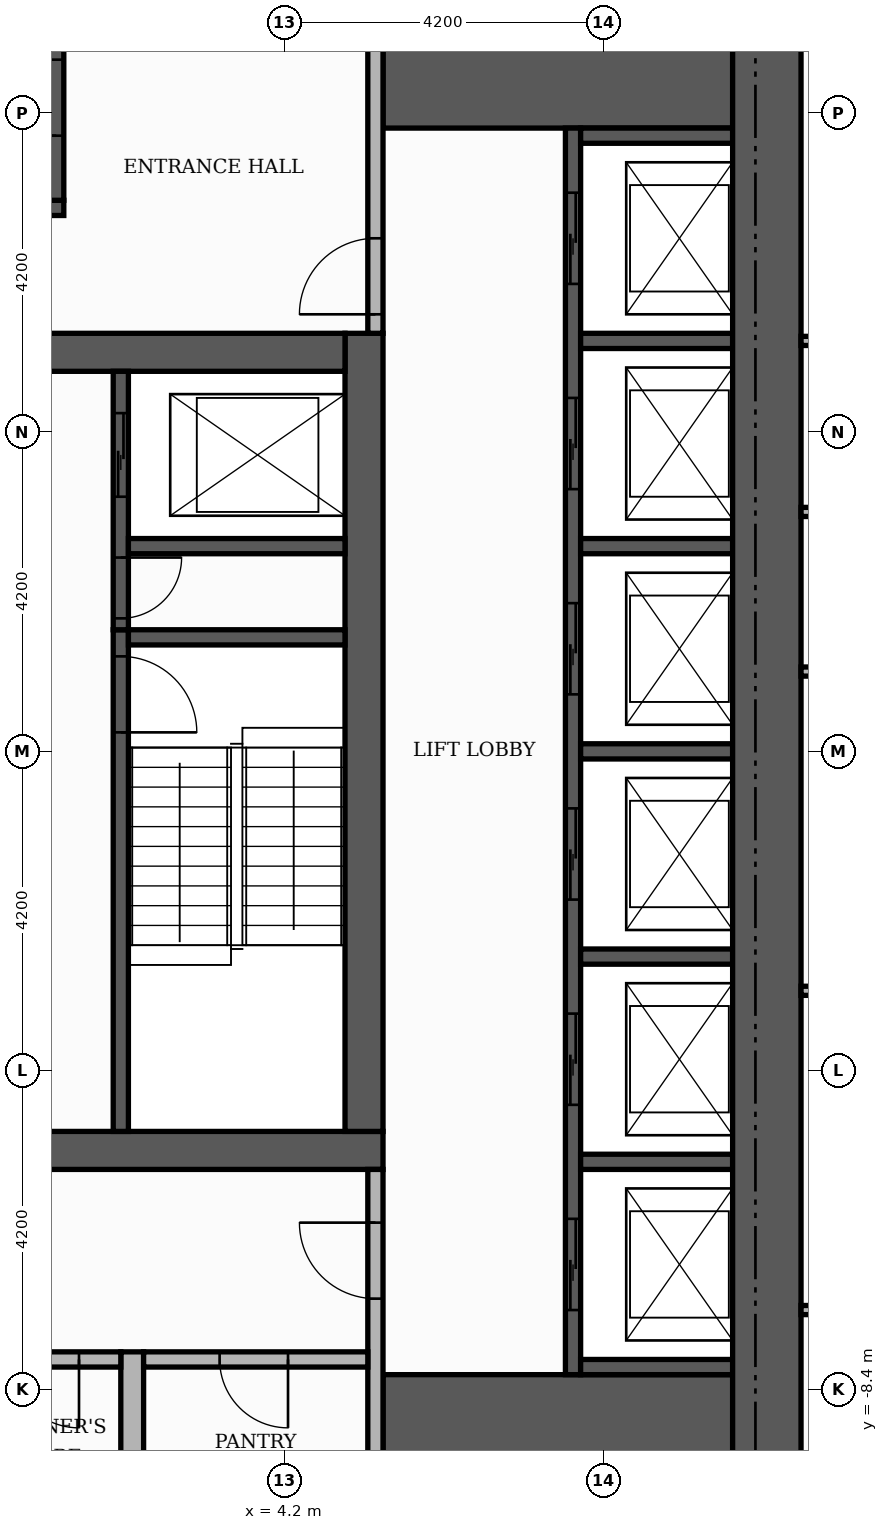
"""IFC4 building model, lengths in metres.
Left out: names, types, materials, properties, quantities, classifications, styles, units other than length and angle.
Written with IfcOpenShell. Run it as: python <this file> out.ifc"""

import sys

from ifc_helpers import new_model, si_unit, direction, frame, frame_2d, origin, place, context, subcontext, project, spatial, rectangle, extrude, element, fill, save


model = new_model("IFC4")
c1 = context("Model", 3, precision=1e-05, world=origin(), true_north=direction((0.0, 1.0)))
c2 = subcontext(c1, "Body", "Model", "MODEL_VIEW")
j1 = project(units=[si_unit("LENGTHUNIT", "METRE"), si_unit("PLANEANGLEUNIT", "RADIAN")], contexts=[c1])
p1 = place(None, origin())
s1 = spatial("IfcSite", under=j1, at=p1, CompositionType="ELEMENT")
p2 = place(p1, origin())
s2 = spatial("IfcBuilding", under=s1, at=p2, CompositionType="ELEMENT")
p3 = place(p2, frame((0.0, 0.0, 204.0)))
s3 = spatial("IfcBuildingStorey", under=s2, at=p3, CompositionType="ELEMENT", Elevation=204.0)
p4 = place(p3, frame((-5.5, -5.25, 0.0), z_axis=(0.0, 0.0, 1.0), x_axis=(1.0, 0.0, 0.0)))
e1 = element("IfcWall", 1, at=p4, inside=s3, PredefinedType="SHEAR", context=c2, shape_type="SweptSolid", body=[
    extrude(rectangle(XDim=11.0, YDim=0.5, at=frame_2d((5.5, 0.0))), origin(), (0.0, 0.0, 1.0), 3.48),
])
p5 = place(p4, frame((4.9, 0.0, 0.0)))
e2 = element("IfcOpeningElement", 2, at=p5, cuts=e1, PredefinedType="OPENING", context=c2, shape_type="SweptSolid", body=[
    extrude(rectangle(XDim=1.2, YDim=2.1, at=frame_2d((0.6, 1.05))), frame((0.0, 0.26, 0.0), z_axis=(0.0, -1.0, 0.0), x_axis=(1.0, 0.0, 0.0)), (0.0, 0.0, 1.0), 0.52),
])
p6 = place(p3, frame((5.25, -5.0, 0.0), z_axis=(0.0, 0.0, 1.0), x_axis=(0.0, 1.0, 0.0)))
e3 = element("IfcWall", 3, at=p6, inside=s3, PredefinedType="SHEAR", context=c2, shape_type="SweptSolid", body=[
    extrude(rectangle(XDim=10.5, YDim=0.5, at=frame_2d((5.25, 0.0))), origin(), (0.0, 0.0, 1.0), 3.48),
])
p7 = place(p3, frame((-5.0, 5.25, 0.0), z_axis=(0.0, 0.0, 1.0), x_axis=(1.0, 0.0, 0.0)))
e4 = element("IfcWall", 4, at=p7, inside=s3, PredefinedType="SHEAR", context=c2, shape_type="SweptSolid", body=[
    extrude(rectangle(XDim=10.0, YDim=0.5, at=frame_2d((5.0, 0.0))), origin(), (0.0, 0.0, 1.0), 3.48),
])
p8 = place(p7, frame((4.4, 0.0, 0.0)))
e5 = element("IfcOpeningElement", 5, at=p8, cuts=e4, PredefinedType="OPENING", context=c2, shape_type="SweptSolid", body=[
    extrude(rectangle(XDim=1.2, YDim=2.1, at=frame_2d((0.6, 1.05))), frame((0.0, 0.26, 0.0), z_axis=(0.0, -1.0, 0.0), x_axis=(1.0, 0.0, 0.0)), (0.0, 0.0, 1.0), 0.52),
])
for number, where, z_axis, x_axis in (
    (6, (5.5, -9.15, 0.0), (0.0, 0.0, 1.0), (1.0, 0.0, 0.0)),
    (7, (5.5, 9.15, 0.0), (0.0, 0.0, 1.0), (1.0, 0.0, 0.0)),
):
    element("IfcWall", number, at=place(p3, frame(where, z_axis=z_axis, x_axis=x_axis)), inside=s3, PredefinedType="SHEAR", context=c2, shape_type="SweptSolid", body=[
        extrude(rectangle(XDim=4.6, YDim=1.9, at=frame_2d((2.3, 0.0))), origin(), (0.0, 0.0, 1.0), 3.48),
    ])
p9 = place(p3, frame((2.05, -5.0, 0.0), z_axis=(0.0, 0.0, 1.0), x_axis=(0.0, 1.0, 0.0)))
e8 = element("IfcWall", 8, at=p9, inside=s3, PredefinedType="SHEAR", context=c2, shape_type="SweptSolid", body=[
    extrude(rectangle(XDim=6.6, YDim=0.2, at=frame_2d((3.3, 0.0))), origin(), (0.0, 0.0, 1.0), 3.48),
])
p10 = place(p9, frame((5.25, 0.0, 0.0)))
e9 = element("IfcOpeningElement", 9, at=p10, cuts=e8, PredefinedType="OPENING", context=c2, shape_type="SweptSolid", body=[
    extrude(rectangle(XDim=1.0, YDim=2.1, at=frame_2d((0.5, 1.05))), frame((0.0, 0.11, 0.0), z_axis=(0.0, -1.0, 0.0), x_axis=(1.0, 0.0, 0.0)), (0.0, 0.0, 1.0), 0.22),
])
p11 = place(p3, frame((2.15, 1.5, 0.0), z_axis=(0.0, 0.0, 1.0), x_axis=(1.0, 0.0, 0.0)))
e10 = element("IfcWall", 10, at=p11, inside=s3, PredefinedType="SHEAR", context=c2, shape_type="SweptSolid", body=[
    extrude(rectangle(XDim=2.85, YDim=0.2, at=frame_2d((1.425, 0.0))), origin(), (0.0, 0.0, 1.0), 3.48),
])
p12 = place(p3, frame((-5.5, 7.15, 0.0), z_axis=(0.0, 0.0, 1.0), x_axis=(1.0, 0.0, 0.0)))
e11 = element("IfcWall", 11, at=p12, inside=s3, PredefinedType="SHEAR", context=c2, shape_type="SweptSolid", body=[
    extrude(rectangle(XDim=6.8, YDim=0.2, at=frame_2d((3.4, 0.0))), origin(), (0.0, 0.0, 1.0), 3.48),
])
p13 = place(p3, frame((1.2, 7.25, 0.0), z_axis=(0.0, 0.0, 1.0), x_axis=(0.0, 1.0, 0.0)))
e12 = element("IfcWall", 12, at=p13, inside=s3, PredefinedType="SHEAR", context=c2, shape_type="SweptSolid", body=[
    extrude(rectangle(XDim=2.85, YDim=0.2, at=frame_2d((1.425, 0.0))), origin(), (0.0, 0.0, 1.0), 3.48),
])
p14 = place(p13, frame((0.85, 0.0, 0.0)))
e13 = element("IfcOpeningElement", 13, at=p14, cuts=e12, PredefinedType="OPENING", context=c2, shape_type="SweptSolid", body=[
    extrude(rectangle(XDim=1.0, YDim=2.1, at=frame_2d((0.5, 1.05))), frame((0.0, 0.11, 0.0), z_axis=(0.0, -1.0, 0.0), x_axis=(1.0, 0.0, 0.0)), (0.0, 0.0, 1.0), 0.22),
])
p15 = place(p3, frame((8.0, -8.2, 0.0), z_axis=(0.0, 0.0, 1.0), x_axis=(0.0, 1.0, 0.0)))
e14 = element("IfcWall", 14, at=p15, inside=s3, PredefinedType="SHEAR", context=c2, shape_type="SweptSolid", body=[
    extrude(rectangle(XDim=16.4, YDim=0.2, at=frame_2d((8.2, 0.0))), origin(), (0.0, 0.0, 1.0), 3.48),
])
p16 = place(p15, frame((0.85, 0.0, 0.0)))
e15 = element("IfcOpeningElement", 15, at=p16, cuts=e14, PredefinedType="OPENING", context=c2, shape_type="SweptSolid", body=[
    extrude(rectangle(XDim=1.2, YDim=2.1, at=frame_2d((0.6, 1.05))), frame((0.0, 0.11, 0.0), z_axis=(0.0, -1.0, 0.0), x_axis=(1.0, 0.0, 0.0)), (0.0, 0.0, 1.0), 0.22),
])
p17 = place(p15, frame((3.55, 0.0, 0.0)))
e16 = element("IfcOpeningElement", 16, at=p17, cuts=e14, PredefinedType="OPENING", context=c2, shape_type="SweptSolid", body=[
    extrude(rectangle(XDim=1.2, YDim=2.1, at=frame_2d((0.6, 1.05))), frame((0.0, 0.11, 0.0), z_axis=(0.0, -1.0, 0.0), x_axis=(1.0, 0.0, 0.0)), (0.0, 0.0, 1.0), 0.22),
])
p18 = place(p15, frame((6.25, 0.0, 0.0)))
e17 = element("IfcOpeningElement", 17, at=p18, cuts=e14, PredefinedType="OPENING", context=c2, shape_type="SweptSolid", body=[
    extrude(rectangle(XDim=1.2, YDim=2.1, at=frame_2d((0.6, 1.05))), frame((0.0, 0.11, 0.0), z_axis=(0.0, -1.0, 0.0), x_axis=(1.0, 0.0, 0.0)), (0.0, 0.0, 1.0), 0.22),
])
p19 = place(p15, frame((8.95, 0.0, 0.0)))
e18 = element("IfcOpeningElement", 18, at=p19, cuts=e14, PredefinedType="OPENING", context=c2, shape_type="SweptSolid", body=[
    extrude(rectangle(XDim=1.2, YDim=2.1, at=frame_2d((0.6, 1.05))), frame((0.0, 0.11, 0.0), z_axis=(0.0, -1.0, 0.0), x_axis=(1.0, 0.0, 0.0)), (0.0, 0.0, 1.0), 0.22),
])
p20 = place(p15, frame((11.65, 0.0, 0.0)))
e19 = element("IfcOpeningElement", 19, at=p20, cuts=e14, PredefinedType="OPENING", context=c2, shape_type="SweptSolid", body=[
    extrude(rectangle(XDim=1.2, YDim=2.1, at=frame_2d((0.6, 1.05))), frame((0.0, 0.11, 0.0), z_axis=(0.0, -1.0, 0.0), x_axis=(1.0, 0.0, 0.0)), (0.0, 0.0, 1.0), 0.22),
])
p21 = place(p15, frame((14.35, 0.0, 0.0)))
e20 = element("IfcOpeningElement", 20, at=p21, cuts=e14, PredefinedType="OPENING", context=c2, shape_type="SweptSolid", body=[
    extrude(rectangle(XDim=1.2, YDim=2.1, at=frame_2d((0.6, 1.05))), frame((0.0, 0.11, 0.0), z_axis=(0.0, -1.0, 0.0), x_axis=(1.0, 0.0, 0.0)), (0.0, 0.0, 1.0), 0.22),
])
for number, where, z_axis, x_axis in (
    (21, (8.1, -8.1, 0.0), (0.0, 0.0, 1.0), (1.0, 0.0, 0.0)),
    (22, (8.1, -5.4, 0.0), (0.0, 0.0, 1.0), (1.0, 0.0, 0.0)),
    (23, (8.1, -2.7, 0.0), (0.0, 0.0, 1.0), (1.0, 0.0, 0.0)),
    (24, (8.1, 0.0, 0.0), (0.0, 0.0, 1.0), (1.0, 0.0, 0.0)),
):
    element("IfcWall", number, at=place(p3, frame(where, z_axis=z_axis, x_axis=x_axis)), inside=s3, PredefinedType="SHEAR", context=c2, shape_type="SweptSolid", body=[
        extrude(rectangle(XDim=2.0, YDim=0.2, at=frame_2d((1.0, 0.0))), origin(), (0.0, 0.0, 1.0), 3.48),
    ])
p22 = place(p3, frame((2.05, 1.6, 0.0), z_axis=(0.0, 0.0, 1.0), x_axis=(0.0, 1.0, 0.0)))
e25 = element("IfcWall", 25, at=p22, inside=s3, PredefinedType="SHEAR", context=c2, shape_type="SweptSolid", body=[
    extrude(rectangle(XDim=3.4, YDim=0.2, at=frame_2d((1.7, 0.0))), origin(), (0.0, 0.0, 1.0), 3.48),
])
p23 = place(p22, frame((1.75, 0.0, 0.0)))
e26 = element("IfcOpeningElement", 26, at=p23, cuts=e25, PredefinedType="OPENING", context=c2, shape_type="SweptSolid", body=[
    extrude(rectangle(XDim=1.1, YDim=2.1, at=frame_2d((0.55, 1.05))), frame((0.0, 0.11, 0.0), z_axis=(0.0, -1.0, 0.0), x_axis=(1.0, 0.0, 0.0)), (0.0, 0.0, 1.0), 0.22),
])
p24 = place(p22, frame((0.15, 0.0, 0.0)))
e27 = element("IfcOpeningElement", 27, at=p24, cuts=e25, PredefinedType="OPENING", context=c2, shape_type="SweptSolid", body=[
    extrude(rectangle(XDim=0.8, YDim=2.1, at=frame_2d((0.4, 1.05))), frame((0.0, 0.11, 0.0), z_axis=(0.0, -1.0, 0.0), x_axis=(1.0, 0.0, 0.0)), (0.0, 0.0, 1.0), 0.22),
])
p25 = place(p3, frame((2.15, 2.7, 0.0), z_axis=(0.0, 0.0, 1.0), x_axis=(1.0, 0.0, 0.0)))
e28 = element("IfcWall", 28, at=p25, inside=s3, PredefinedType="SHEAR", context=c2, shape_type="SweptSolid", body=[
    extrude(rectangle(XDim=2.85, YDim=0.2, at=frame_2d((1.425, 0.0))), origin(), (0.0, 0.0, 1.0), 3.48),
])
for number, where, z_axis, x_axis in (
    (29, (8.1, 2.7, 0.0), (0.0, 0.0, 1.0), (1.0, 0.0, 0.0)),
    (30, (8.1, 5.4, 0.0), (0.0, 0.0, 1.0), (1.0, 0.0, 0.0)),
    (31, (8.1, 8.1, 0.0), (0.0, 0.0, 1.0), (1.0, 0.0, 0.0)),
):
    element("IfcWall", number, at=place(p3, frame(where, z_axis=z_axis, x_axis=x_axis)), inside=s3, PredefinedType="SHEAR", context=c2, shape_type="SweptSolid", body=[
        extrude(rectangle(XDim=2.0, YDim=0.2, at=frame_2d((1.0, 0.0))), origin(), (0.0, 0.0, 1.0), 3.48),
    ])
p26 = place(p3, frame((10.55, -10.1, 0.0), z_axis=(0.0, 0.0, 1.0), x_axis=(0.0, 1.0, 0.0)))
e32 = element("IfcWall", 32, at=p26, inside=s3, PredefinedType="SHEAR", context=c2, shape_type="SweptSolid", body=[
    extrude(rectangle(XDim=20.2, YDim=0.9, at=frame_2d((10.1, 0.0))), origin(), (0.0, 0.0, 1.0), 3.48),
])
p27 = place(p3, frame((2.2, -10.1, 0.0), z_axis=(0.0, 0.0, 1.0), x_axis=(0.0, 1.0, 0.0)))
e33 = element("IfcWall", 33, at=p27, inside=s3, PredefinedType="PARTITIONING", context=c2, shape_type="SweptSolid", body=[
    extrude(rectangle(XDim=2.2, YDim=0.3, at=frame_2d((1.1, 0.0))), origin(), (0.0, 0.0, 1.0), 3.48),
])
p28 = place(p3, frame((5.4, -10.1, 0.0), z_axis=(0.0, 0.0, 1.0), x_axis=(0.0, 1.0, 0.0)))
e34 = element("IfcWall", 34, at=p28, inside=s3, PredefinedType="PARTITIONING", context=c2, shape_type="SweptSolid", body=[
    extrude(rectangle(XDim=4.6, YDim=0.2, at=frame_2d((2.3, 0.0))), origin(), (0.0, 0.0, 1.0), 3.48),
])
p29 = place(p28, frame((2.9, 0.0, 0.0)))
e35 = element("IfcOpeningElement", 35, at=p29, cuts=e34, PredefinedType="OPENING", context=c2, shape_type="SweptSolid", body=[
    extrude(rectangle(XDim=1.0, YDim=2.1, at=frame_2d((0.5, 1.05))), frame((0.0, 0.11, 0.0), z_axis=(0.0, -1.0, 0.0), x_axis=(1.0, 0.0, 0.0)), (0.0, 0.0, 1.0), 0.22),
])
p30 = place(p3, frame((0.1, -8.0, 0.0), z_axis=(0.0, 0.0, 1.0), x_axis=(1.0, 0.0, 0.0)))
e36 = element("IfcWall", 36, at=p30, inside=s3, PredefinedType="PARTITIONING", context=c2, shape_type="SweptSolid", body=[
    extrude(rectangle(XDim=1.95, YDim=0.2, at=frame_2d((0.975, 0.0))), origin(), (0.0, 0.0, 1.0), 3.48),
])
p31 = place(p30, frame((0.5, 0.0, 0.0)))
e37 = element("IfcOpeningElement", 37, at=p31, cuts=e36, PredefinedType="OPENING", context=c2, shape_type="SweptSolid", body=[
    extrude(rectangle(XDim=0.9, YDim=2.1, at=frame_2d((0.45, 1.05))), frame((0.0, 0.11, 0.0), z_axis=(0.0, -1.0, 0.0), x_axis=(1.0, 0.0, 0.0)), (0.0, 0.0, 1.0), 0.22),
])
p32 = place(p3, frame((2.35, -8.0, 0.0), z_axis=(0.0, 0.0, 1.0), x_axis=(1.0, 0.0, 0.0)))
e38 = element("IfcWall", 38, at=p32, inside=s3, PredefinedType="PARTITIONING", context=c2, shape_type="SweptSolid", body=[
    extrude(rectangle(XDim=2.95, YDim=0.2, at=frame_2d((1.475, 0.0))), origin(), (0.0, 0.0, 1.0), 3.48),
])
p33 = place(p32, frame((1.0, 0.0, 0.0)))
e39 = element("IfcOpeningElement", 39, at=p33, cuts=e38, PredefinedType="OPENING", context=c2, shape_type="SweptSolid", body=[
    extrude(rectangle(XDim=0.9, YDim=2.1, at=frame_2d((0.45, 1.05))), frame((0.0, 0.11, 0.0), z_axis=(0.0, -1.0, 0.0), x_axis=(1.0, 0.0, 0.0)), (0.0, 0.0, 1.0), 0.22),
])
p34 = place(p3, frame((5.4, 5.5, 0.0), z_axis=(0.0, 0.0, 1.0), x_axis=(0.0, 1.0, 0.0)))
e40 = element("IfcWall", 40, at=p34, inside=s3, PredefinedType="PARTITIONING", context=c2, shape_type="SweptSolid", body=[
    extrude(rectangle(XDim=4.6, YDim=0.2, at=frame_2d((2.3, 0.0))), origin(), (0.0, 0.0, 1.0), 3.48),
])
p35 = place(p34, frame((0.25, 0.0, 0.0)))
e41 = element("IfcOpeningElement", 41, at=p35, cuts=e40, PredefinedType="OPENING", context=c2, shape_type="SweptSolid", body=[
    extrude(rectangle(XDim=1.0, YDim=2.1, at=frame_2d((0.5, 1.05))), frame((0.0, 0.11, 0.0), z_axis=(0.0, -1.0, 0.0), x_axis=(1.0, 0.0, 0.0)), (0.0, 0.0, 1.0), 0.22),
])
p36 = place(p3, frame((11.0, -7.35, 0.0), z_axis=(0.0, 0.0, 1.0), x_axis=(1.0, 0.0, 0.0)))
e42 = element("IfcWall", 42, at=p36, inside=s3, PredefinedType="PARTITIONING", context=c2, shape_type="SweptSolid", body=[
    extrude(rectangle(XDim=7.62, YDim=0.12, at=frame_2d((3.81, 0.0))), origin(), (0.0, 0.0, 1.0), 3.48),
])
p37 = place(p36, frame((3.36, 0.0, 0.0)))
e43 = element("IfcOpeningElement", 43, at=p37, cuts=e42, PredefinedType="OPENING", context=c2, shape_type="SweptSolid", body=[
    extrude(rectangle(XDim=0.9, YDim=2.1, at=frame_2d((0.45, 1.05))), frame((0.0, 0.07, 0.0), z_axis=(0.0, -1.0, 0.0), x_axis=(1.0, 0.0, 0.0)), (0.0, 0.0, 1.0), 0.14),
])
for number, where, z_axis, x_axis in (
    (44, (11.0, -3.15, 0.0), (0.0, 0.0, 1.0), (1.0, 0.0, 0.0)),
    (45, (11.0, 1.05, 0.0), (0.0, 0.0, 1.0), (1.0, 0.0, 0.0)),
    (46, (11.0, 3.15, 0.0), (0.0, 0.0, 1.0), (1.0, 0.0, 0.0)),
    (47, (11.0, 5.4, 0.0), (0.0, 0.0, 1.0), (1.0, 0.0, 0.0)),
):
    element("IfcWall", number, at=place(p3, frame(where, z_axis=z_axis, x_axis=x_axis)), inside=s3, PredefinedType="PARTITIONING", context=c2, shape_type="SweptSolid", body=[
        extrude(rectangle(XDim=7.62, YDim=0.12, at=frame_2d((3.81, 0.0))), origin(), (0.0, 0.0, 1.0), 3.48),
    ])
p38 = place(p16, origin())
e48 = element("IfcDoor", 48, at=p38, inside=s3, OperationType="SLIDING_TO_LEFT", PredefinedType="DOOR", context=c2, shape_type="SweptSolid", body=[
    extrude(rectangle(XDim=1.2, YDim=2.1, at=frame_2d((0.6, 1.05))), frame((0.0, 0.025, 0.0), z_axis=(0.0, -1.0, 0.0), x_axis=(1.0, 0.0, 0.0)), (0.0, 0.0, 1.0), 0.05),
])
fill(e15, e48)
p39 = place(p17, origin())
e49 = element("IfcDoor", 49, at=p39, inside=s3, OperationType="SLIDING_TO_LEFT", PredefinedType="DOOR", context=c2, shape_type="SweptSolid", body=[
    extrude(rectangle(XDim=1.2, YDim=2.1, at=frame_2d((0.6, 1.05))), frame((0.0, 0.025, 0.0), z_axis=(0.0, -1.0, 0.0), x_axis=(1.0, 0.0, 0.0)), (0.0, 0.0, 1.0), 0.05),
])
fill(e16, e49)
p40 = place(p18, origin())
e50 = element("IfcDoor", 50, at=p40, inside=s3, OperationType="SLIDING_TO_LEFT", PredefinedType="DOOR", context=c2, shape_type="SweptSolid", body=[
    extrude(rectangle(XDim=1.2, YDim=2.1, at=frame_2d((0.6, 1.05))), frame((0.0, 0.025, 0.0), z_axis=(0.0, -1.0, 0.0), x_axis=(1.0, 0.0, 0.0)), (0.0, 0.0, 1.0), 0.05),
])
fill(e17, e50)
p41 = place(p19, origin())
e51 = element("IfcDoor", 51, at=p41, inside=s3, OperationType="SLIDING_TO_LEFT", PredefinedType="DOOR", context=c2, shape_type="SweptSolid", body=[
    extrude(rectangle(XDim=1.2, YDim=2.1, at=frame_2d((0.6, 1.05))), frame((0.0, 0.025, 0.0), z_axis=(0.0, -1.0, 0.0), x_axis=(1.0, 0.0, 0.0)), (0.0, 0.0, 1.0), 0.05),
])
fill(e18, e51)
p42 = place(p20, origin())
e52 = element("IfcDoor", 52, at=p42, inside=s3, OperationType="SLIDING_TO_LEFT", PredefinedType="DOOR", context=c2, shape_type="SweptSolid", body=[
    extrude(rectangle(XDim=1.2, YDim=2.1, at=frame_2d((0.6, 1.05))), frame((0.0, 0.025, 0.0), z_axis=(0.0, -1.0, 0.0), x_axis=(1.0, 0.0, 0.0)), (0.0, 0.0, 1.0), 0.05),
])
fill(e19, e52)
p43 = place(p21, origin())
e53 = element("IfcDoor", 53, at=p43, inside=s3, OperationType="SLIDING_TO_LEFT", PredefinedType="DOOR", context=c2, shape_type="SweptSolid", body=[
    extrude(rectangle(XDim=1.2, YDim=2.1, at=frame_2d((0.6, 1.05))), frame((0.0, 0.025, 0.0), z_axis=(0.0, -1.0, 0.0), x_axis=(1.0, 0.0, 0.0)), (0.0, 0.0, 1.0), 0.05),
])
fill(e20, e53)
p44 = place(p23, origin())
e54 = element("IfcDoor", 54, at=p44, inside=s3, OperationType="SLIDING_TO_LEFT", PredefinedType="DOOR", context=c2, shape_type="SweptSolid", body=[
    extrude(rectangle(XDim=1.1, YDim=2.1, at=frame_2d((0.55, 1.05))), frame((0.0, 0.025, 0.0), z_axis=(0.0, -1.0, 0.0), x_axis=(1.0, 0.0, 0.0)), (0.0, 0.0, 1.0), 0.05),
])
fill(e26, e54)
p45 = place(p10, frame((1.0, 0.0, 0.0), z_axis=(0.0, 0.0, 1.0), x_axis=(-1.0, 0.0, 0.0)))
e55 = element("IfcDoor", 55, at=p45, inside=s3, OperationType="SINGLE_SWING_LEFT", PredefinedType="DOOR", context=c2, shape_type="SweptSolid", body=[
    extrude(rectangle(XDim=1.0, YDim=2.1, at=frame_2d((0.5, 1.05))), frame((0.0, 0.025, 0.0), z_axis=(0.0, -1.0, 0.0), x_axis=(1.0, 0.0, 0.0)), (0.0, 0.0, 1.0), 0.05),
])
fill(e9, e55)
p46 = place(p24, frame((0.8, 0.0, 0.0), z_axis=(0.0, 0.0, 1.0), x_axis=(-1.0, 0.0, 0.0)))
e56 = element("IfcDoor", 56, at=p46, inside=s3, OperationType="SINGLE_SWING_RIGHT", PredefinedType="DOOR", context=c2, shape_type="SweptSolid", body=[
    extrude(rectangle(XDim=0.8, YDim=2.1, at=frame_2d((0.4, 1.05))), frame((0.0, 0.025, 0.0), z_axis=(0.0, -1.0, 0.0), x_axis=(1.0, 0.0, 0.0)), (0.0, 0.0, 1.0), 0.05),
])
fill(e27, e56)
p47 = place(p14, origin())
e57 = element("IfcDoor", 57, at=p47, inside=s3, OperationType="SINGLE_SWING_LEFT", PredefinedType="DOOR", context=c2, shape_type="SweptSolid", body=[
    extrude(rectangle(XDim=1.0, YDim=2.1, at=frame_2d((0.5, 1.05))), frame((0.0, 0.025, 0.0), z_axis=(0.0, -1.0, 0.0), x_axis=(1.0, 0.0, 0.0)), (0.0, 0.0, 1.0), 0.05),
])
fill(e13, e57)
p48 = place(p35, origin())
e58 = element("IfcDoor", 58, at=p48, inside=s3, OperationType="SINGLE_SWING_LEFT", PredefinedType="DOOR", context=c2, shape_type="SweptSolid", body=[
    extrude(rectangle(XDim=1.0, YDim=2.1, at=frame_2d((0.5, 1.05))), frame((0.0, 0.025, 0.0), z_axis=(0.0, -1.0, 0.0), x_axis=(1.0, 0.0, 0.0)), (0.0, 0.0, 1.0), 0.05),
])
fill(e41, e58)
p49 = place(p29, origin())
e59 = element("IfcDoor", 59, at=p49, inside=s3, OperationType="SINGLE_SWING_RIGHT", PredefinedType="DOOR", context=c2, shape_type="SweptSolid", body=[
    extrude(rectangle(XDim=1.0, YDim=2.1, at=frame_2d((0.5, 1.05))), frame((0.0, 0.025, 0.0), z_axis=(0.0, -1.0, 0.0), x_axis=(1.0, 0.0, 0.0)), (0.0, 0.0, 1.0), 0.05),
])
fill(e35, e59)
p50 = place(p31, frame((0.9, 0.0, 0.0), z_axis=(0.0, 0.0, 1.0), x_axis=(-1.0, 0.0, 0.0)))
e60 = element("IfcDoor", 60, at=p50, inside=s3, OperationType="SINGLE_SWING_RIGHT", PredefinedType="DOOR", context=c2, shape_type="SweptSolid", body=[
    extrude(rectangle(XDim=0.9, YDim=2.1, at=frame_2d((0.45, 1.05))), frame((0.0, 0.025, 0.0), z_axis=(0.0, -1.0, 0.0), x_axis=(1.0, 0.0, 0.0)), (0.0, 0.0, 1.0), 0.05),
])
fill(e37, e60)
p51 = place(p33, frame((0.9, 0.0, 0.0), z_axis=(0.0, 0.0, 1.0), x_axis=(-1.0, 0.0, 0.0)))
e61 = element("IfcDoor", 61, at=p51, inside=s3, OperationType="SINGLE_SWING_RIGHT", PredefinedType="DOOR", context=c2, shape_type="SweptSolid", body=[
    extrude(rectangle(XDim=0.9, YDim=2.1, at=frame_2d((0.45, 1.05))), frame((0.0, 0.025, 0.0), z_axis=(0.0, -1.0, 0.0), x_axis=(1.0, 0.0, 0.0)), (0.0, 0.0, 1.0), 0.05),
])
fill(e39, e61)
save(model, sys.argv[1])
